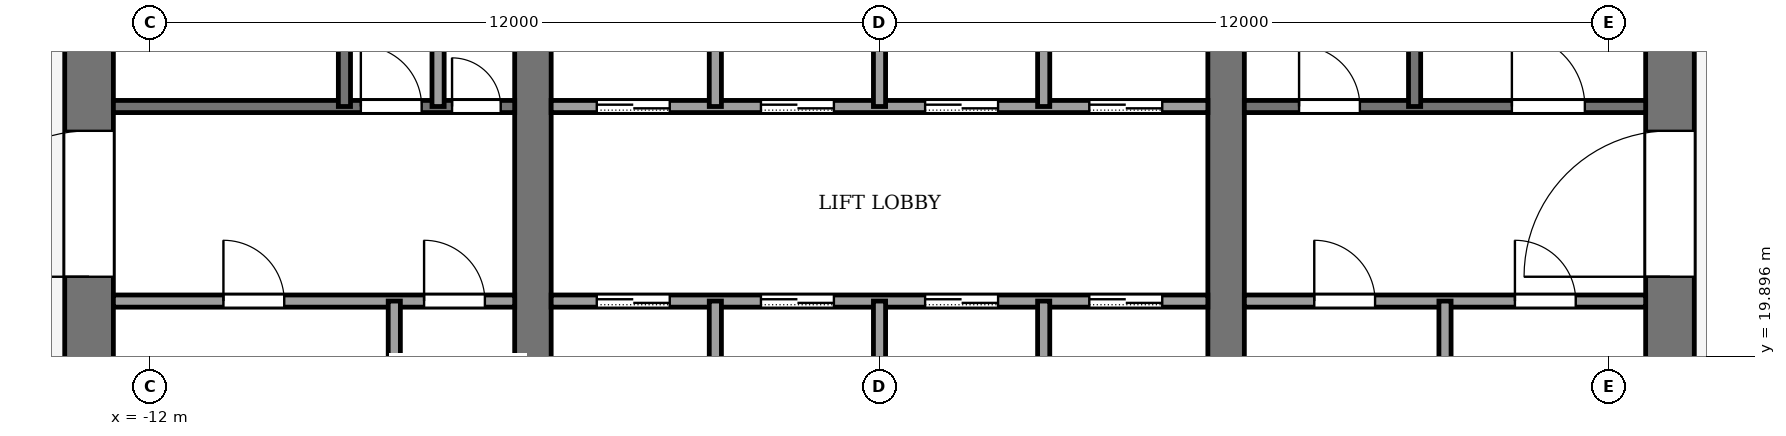
"""IFC4 building model, lengths in metres.
Left out: names, types, materials, properties, quantities, classifications, styles, units other than length and angle.
Written with IfcOpenShell. Run it as: python <this file> out.ifc"""

import sys

from ifc_helpers import new_model, si_unit, direction, frame, frame_2d, origin, place, context, subcontext, project, spatial, rectangle, extrude, element, fill, save


model = new_model("IFC4")
c1 = context("Model", 3, precision=1e-05, world=origin(), true_north=direction((0.0, 1.0)))
c2 = subcontext(c1, "Body", "Model", "MODEL_VIEW")
j1 = project(units=[si_unit("LENGTHUNIT", "METRE"), si_unit("PLANEANGLEUNIT", "RADIAN")], contexts=[c1])
p1 = place(None, origin())
s1 = spatial("IfcSite", under=j1, at=p1, CompositionType="ELEMENT")
p2 = place(p1, origin())
s2 = spatial("IfcBuilding", under=s1, at=p2, CompositionType="ELEMENT")
p3 = place(p2, frame((0.0, 0.0, 258.0)))
s3 = spatial("IfcBuildingStorey", under=s2, at=p3, CompositionType="ELEMENT", Elevation=258.0)
p4 = place(p3, frame((-13.0, 18.4, -0.13), z_axis=(0.0, 0.0, 1.0), x_axis=(0.0, 1.0, 0.0)))
e1 = element("IfcWall", 1, at=p4, inside=s3, PredefinedType="SHEAR", context=c2, shape_type="SweptSolid", body=[
    extrude(rectangle(XDim=19.2, YDim=0.8, at=frame_2d((9.6, 0.0))), origin(), (0.0, 0.0, 1.0), 4.0),
])
p5 = place(p4, frame((2.8, 0.0, 0.13)))
e2 = element("IfcOpeningElement", 2, at=p5, cuts=e1, PredefinedType="OPENING", context=c2, shape_type="SweptSolid", body=[
    extrude(rectangle(XDim=2.4, YDim=2.4, at=frame_2d((1.2, 1.2))), frame((0.0, 0.41, 0.0), z_axis=(0.0, -1.0, 0.0), x_axis=(1.0, 0.0, 0.0)), (0.0, 0.0, 1.0), 0.82),
])
p6 = place(p4, frame((13.4, 0.0, 0.13)))
e3 = element("IfcOpeningElement", 3, at=p6, cuts=e1, PredefinedType="OPENING", context=c2, shape_type="SweptSolid", body=[
    extrude(rectangle(XDim=1.4, YDim=2.2, at=frame_2d((0.7, 1.1))), frame((0.0, 0.41, 0.0), z_axis=(0.0, -1.0, 0.0), x_axis=(1.0, 0.0, 0.0)), (0.0, 0.0, 1.0), 0.82),
])
p7 = place(p3, frame((13.0, 18.4, -0.13), z_axis=(0.0, 0.0, 1.0), x_axis=(0.0, 1.0, 0.0)))
e4 = element("IfcWall", 4, at=p7, inside=s3, PredefinedType="SHEAR", context=c2, shape_type="SweptSolid", body=[
    extrude(rectangle(XDim=19.2, YDim=0.8, at=frame_2d((9.6, 0.0))), origin(), (0.0, 0.0, 1.0), 4.0),
])
p8 = place(p7, frame((2.8, 0.0, 0.13)))
e5 = element("IfcOpeningElement", 5, at=p8, cuts=e4, PredefinedType="OPENING", context=c2, shape_type="SweptSolid", body=[
    extrude(rectangle(XDim=2.4, YDim=2.4, at=frame_2d((1.2, 1.2))), frame((0.0, 0.41, 0.0), z_axis=(0.0, -1.0, 0.0), x_axis=(1.0, 0.0, 0.0)), (0.0, 0.0, 1.0), 0.82),
])
p9 = place(p7, frame((13.3, 0.0, 0.13)))
e6 = element("IfcOpeningElement", 6, at=p9, cuts=e4, PredefinedType="OPENING", context=c2, shape_type="SweptSolid", body=[
    extrude(rectangle(XDim=2.4, YDim=2.4, at=frame_2d((1.2, 1.2))), frame((0.0, 0.41, 0.0), z_axis=(0.0, -1.0, 0.0), x_axis=(1.0, 0.0, 0.0)), (0.0, 0.0, 1.0), 0.82),
])
p10 = place(p3, frame((-5.7, 18.4, -0.13), z_axis=(0.0, 0.0, 1.0), x_axis=(0.0, 1.0, 0.0)))
e7 = element("IfcWall", 7, at=p10, inside=s3, PredefinedType="SHEAR", context=c2, shape_type="SweptSolid", body=[
    extrude(rectangle(XDim=19.2, YDim=0.6, at=frame_2d((9.6, 0.0))), origin(), (0.0, 0.0, 1.0), 4.0),
])
p11 = place(p10, frame((8.35, 0.0, 0.13)))
e8 = element("IfcOpeningElement", 8, at=p11, cuts=e7, PredefinedType="OPENING", context=c2, shape_type="SweptSolid", body=[
    extrude(rectangle(XDim=0.9, YDim=2.1, at=frame_2d((0.45, 1.05))), frame((0.0, 0.31, 0.0), z_axis=(0.0, -1.0, 0.0), x_axis=(1.0, 0.0, 0.0)), (0.0, 0.0, 1.0), 0.62),
])
p12 = place(p3, frame((5.7, 18.4, -0.13), z_axis=(0.0, 0.0, 1.0), x_axis=(0.0, 1.0, 0.0)))
e9 = element("IfcWall", 9, at=p12, inside=s3, PredefinedType="SHEAR", context=c2, shape_type="SweptSolid", body=[
    extrude(rectangle(XDim=19.2, YDim=0.6, at=frame_2d((9.6, 0.0))), origin(), (0.0, 0.0, 1.0), 4.0),
])
p13 = place(p12, frame((8.35, 0.0, 0.13)))
e10 = element("IfcOpeningElement", 10, at=p13, cuts=e9, PredefinedType="OPENING", context=c2, shape_type="SweptSolid", body=[
    extrude(rectangle(XDim=0.9, YDim=2.1, at=frame_2d((0.45, 1.05))), frame((0.0, 0.31, 0.0), z_axis=(0.0, -1.0, 0.0), x_axis=(1.0, 0.0, 0.0)), (0.0, 0.0, 1.0), 0.62),
])
p14 = place(p12, frame((13.3, 0.0, 0.13)))
e11 = element("IfcOpeningElement", 11, at=p14, cuts=e9, PredefinedType="OPENING", context=c2, shape_type="SweptSolid", body=[
    extrude(rectangle(XDim=2.4, YDim=2.4, at=frame_2d((1.2, 1.2))), frame((0.0, 0.31, 0.0), z_axis=(0.0, -1.0, 0.0), x_axis=(1.0, 0.0, 0.0)), (0.0, 0.0, 1.0), 0.62),
])
p15 = place(p3, frame((-12.6, 20.8, 0.0), z_axis=(0.0, 0.0, 1.0), x_axis=(1.0, 0.0, 0.0)))
e12 = element("IfcWall", 12, at=p15, inside=s3, PredefinedType="PARTITIONING", context=c2, shape_type="SweptSolid", body=[
    extrude(rectangle(XDim=6.6, YDim=0.2, at=frame_2d((3.3, 0.0))), origin(), (0.0, 0.0, 1.0), 3.87),
])
p16 = place(p15, frame((1.81, 0.0, 0.0)))
e13 = element("IfcOpeningElement", 13, at=p16, cuts=e12, PredefinedType="OPENING", context=c2, shape_type="SweptSolid", body=[
    extrude(rectangle(XDim=1.0, YDim=2.1, at=frame_2d((0.5, 1.05))), frame((0.0, 0.11, 0.0), z_axis=(0.0, -1.0, 0.0), x_axis=(1.0, 0.0, 0.0)), (0.0, 0.0, 1.0), 0.22),
])
p17 = place(p15, frame((5.11, 0.0, 0.0)))
e14 = element("IfcOpeningElement", 14, at=p17, cuts=e12, PredefinedType="OPENING", context=c2, shape_type="SweptSolid", body=[
    extrude(rectangle(XDim=1.0, YDim=2.1, at=frame_2d((0.5, 1.05))), frame((0.0, 0.11, 0.0), z_axis=(0.0, -1.0, 0.0), x_axis=(1.0, 0.0, 0.0)), (0.0, 0.0, 1.0), 0.22),
])
p18 = place(p3, frame((-5.4, 20.8, 0.0), z_axis=(0.0, 0.0, 1.0), x_axis=(1.0, 0.0, 0.0)))
e15 = element("IfcWall", 15, at=p18, inside=s3, PredefinedType="PARTITIONING", context=c2, shape_type="SweptSolid", body=[
    extrude(rectangle(XDim=10.8, YDim=0.2, at=frame_2d((5.4, 0.0))), origin(), (0.0, 0.0, 1.0), 3.87),
])
p19 = place(p18, frame((0.75, 0.0, 0.0)))
e16 = element("IfcOpeningElement", 16, at=p19, cuts=e15, PredefinedType="OPENING", context=c2, shape_type="SweptSolid", body=[
    extrude(rectangle(XDim=1.2, YDim=2.2, at=frame_2d((0.6, 1.1))), frame((0.0, 0.11, 0.0), z_axis=(0.0, -1.0, 0.0), x_axis=(1.0, 0.0, 0.0)), (0.0, 0.0, 1.0), 0.22),
])
p20 = place(p18, frame((3.45, 0.0, 0.0)))
e17 = element("IfcOpeningElement", 17, at=p20, cuts=e15, PredefinedType="OPENING", context=c2, shape_type="SweptSolid", body=[
    extrude(rectangle(XDim=1.2, YDim=2.2, at=frame_2d((0.6, 1.1))), frame((0.0, 0.11, 0.0), z_axis=(0.0, -1.0, 0.0), x_axis=(1.0, 0.0, 0.0)), (0.0, 0.0, 1.0), 0.22),
])
p21 = place(p18, frame((6.15, 0.0, 0.0)))
e18 = element("IfcOpeningElement", 18, at=p21, cuts=e15, PredefinedType="OPENING", context=c2, shape_type="SweptSolid", body=[
    extrude(rectangle(XDim=1.2, YDim=2.2, at=frame_2d((0.6, 1.1))), frame((0.0, 0.11, 0.0), z_axis=(0.0, -1.0, 0.0), x_axis=(1.0, 0.0, 0.0)), (0.0, 0.0, 1.0), 0.22),
])
p22 = place(p18, frame((8.85, 0.0, 0.0)))
e19 = element("IfcOpeningElement", 19, at=p22, cuts=e15, PredefinedType="OPENING", context=c2, shape_type="SweptSolid", body=[
    extrude(rectangle(XDim=1.2, YDim=2.2, at=frame_2d((0.6, 1.1))), frame((0.0, 0.11, 0.0), z_axis=(0.0, -1.0, 0.0), x_axis=(1.0, 0.0, 0.0)), (0.0, 0.0, 1.0), 0.22),
])
p23 = place(p3, frame((6.0, 20.8, 0.0), z_axis=(0.0, 0.0, 1.0), x_axis=(1.0, 0.0, 0.0)))
e20 = element("IfcWall", 20, at=p23, inside=s3, PredefinedType="PARTITIONING", context=c2, shape_type="SweptSolid", body=[
    extrude(rectangle(XDim=6.6, YDim=0.2, at=frame_2d((3.3, 0.0))), origin(), (0.0, 0.0, 1.0), 3.87),
])
p24 = place(p23, frame((1.15, 0.0, 0.0)))
e21 = element("IfcOpeningElement", 21, at=p24, cuts=e20, PredefinedType="OPENING", context=c2, shape_type="SweptSolid", body=[
    extrude(rectangle(XDim=1.0, YDim=2.1, at=frame_2d((0.5, 1.05))), frame((0.0, 0.11, 0.0), z_axis=(0.0, -1.0, 0.0), x_axis=(1.0, 0.0, 0.0)), (0.0, 0.0, 1.0), 0.22),
])
p25 = place(p23, frame((4.45, 0.0, 0.0)))
e22 = element("IfcOpeningElement", 22, at=p25, cuts=e20, PredefinedType="OPENING", context=c2, shape_type="SweptSolid", body=[
    extrude(rectangle(XDim=1.0, YDim=2.1, at=frame_2d((0.5, 1.05))), frame((0.0, 0.11, 0.0), z_axis=(0.0, -1.0, 0.0), x_axis=(1.0, 0.0, 0.0)), (0.0, 0.0, 1.0), 0.22),
])
p26 = place(p3, frame((-12.6, 24.0, 0.0), z_axis=(0.0, 0.0, 1.0), x_axis=(1.0, 0.0, 0.0)))
e23 = element("IfcWall", 23, at=p26, inside=s3, PredefinedType="PARTITIONING", context=c2, shape_type="SweptSolid", body=[
    extrude(rectangle(XDim=6.6, YDim=0.2, at=frame_2d((3.3, 0.0))), origin(), (0.0, 0.0, 1.0), 3.87),
])
p27 = place(p26, frame((4.07, 0.0, 0.0)))
e24 = element("IfcOpeningElement", 24, at=p27, cuts=e23, PredefinedType="OPENING", context=c2, shape_type="SweptSolid", body=[
    extrude(rectangle(XDim=1.0, YDim=2.1, at=frame_2d((0.5, 1.05))), frame((0.0, 0.11, 0.0), z_axis=(0.0, -1.0, 0.0), x_axis=(1.0, 0.0, 0.0)), (0.0, 0.0, 1.0), 0.22),
])
p28 = place(p26, frame((5.57, 0.0, 0.0)))
e25 = element("IfcOpeningElement", 25, at=p28, cuts=e23, PredefinedType="OPENING", context=c2, shape_type="SweptSolid", body=[
    extrude(rectangle(XDim=0.8, YDim=2.1, at=frame_2d((0.4, 1.05))), frame((0.0, 0.11, 0.0), z_axis=(0.0, -1.0, 0.0), x_axis=(1.0, 0.0, 0.0)), (0.0, 0.0, 1.0), 0.22),
])
p29 = place(p3, frame((-5.4, 24.0, 0.0), z_axis=(0.0, 0.0, 1.0), x_axis=(1.0, 0.0, 0.0)))
e26 = element("IfcWall", 26, at=p29, inside=s3, PredefinedType="PARTITIONING", context=c2, shape_type="SweptSolid", body=[
    extrude(rectangle(XDim=10.8, YDim=0.2, at=frame_2d((5.4, 0.0))), origin(), (0.0, 0.0, 1.0), 3.87),
])
p30 = place(p29, frame((0.75, 0.0, 0.0)))
e27 = element("IfcOpeningElement", 27, at=p30, cuts=e26, PredefinedType="OPENING", context=c2, shape_type="SweptSolid", body=[
    extrude(rectangle(XDim=1.2, YDim=2.2, at=frame_2d((0.6, 1.1))), frame((0.0, 0.11, 0.0), z_axis=(0.0, -1.0, 0.0), x_axis=(1.0, 0.0, 0.0)), (0.0, 0.0, 1.0), 0.22),
])
p31 = place(p29, frame((3.45, 0.0, 0.0)))
e28 = element("IfcOpeningElement", 28, at=p31, cuts=e26, PredefinedType="OPENING", context=c2, shape_type="SweptSolid", body=[
    extrude(rectangle(XDim=1.2, YDim=2.2, at=frame_2d((0.6, 1.1))), frame((0.0, 0.11, 0.0), z_axis=(0.0, -1.0, 0.0), x_axis=(1.0, 0.0, 0.0)), (0.0, 0.0, 1.0), 0.22),
])
p32 = place(p29, frame((6.15, 0.0, 0.0)))
e29 = element("IfcOpeningElement", 29, at=p32, cuts=e26, PredefinedType="OPENING", context=c2, shape_type="SweptSolid", body=[
    extrude(rectangle(XDim=1.2, YDim=2.2, at=frame_2d((0.6, 1.1))), frame((0.0, 0.11, 0.0), z_axis=(0.0, -1.0, 0.0), x_axis=(1.0, 0.0, 0.0)), (0.0, 0.0, 1.0), 0.22),
])
p33 = place(p29, frame((8.85, 0.0, 0.0)))
e30 = element("IfcOpeningElement", 30, at=p33, cuts=e26, PredefinedType="OPENING", context=c2, shape_type="SweptSolid", body=[
    extrude(rectangle(XDim=1.2, YDim=2.2, at=frame_2d((0.6, 1.1))), frame((0.0, 0.11, 0.0), z_axis=(0.0, -1.0, 0.0), x_axis=(1.0, 0.0, 0.0)), (0.0, 0.0, 1.0), 0.22),
])
p34 = place(p3, frame((6.0, 24.0, 0.0), z_axis=(0.0, 0.0, 1.0), x_axis=(1.0, 0.0, 0.0)))
e31 = element("IfcWall", 31, at=p34, inside=s3, PredefinedType="PARTITIONING", context=c2, shape_type="SweptSolid", body=[
    extrude(rectangle(XDim=6.6, YDim=0.2, at=frame_2d((3.3, 0.0))), origin(), (0.0, 0.0, 1.0), 3.87),
])
p35 = place(p34, frame((0.9, 0.0, 0.0)))
e32 = element("IfcOpeningElement", 32, at=p35, cuts=e31, PredefinedType="OPENING", context=c2, shape_type="SweptSolid", body=[
    extrude(rectangle(XDim=1.0, YDim=2.1, at=frame_2d((0.5, 1.05))), frame((0.0, 0.11, 0.0), z_axis=(0.0, -1.0, 0.0), x_axis=(1.0, 0.0, 0.0)), (0.0, 0.0, 1.0), 0.22),
])
p36 = place(p34, frame((4.4, 0.0, 0.0)))
e33 = element("IfcOpeningElement", 33, at=p36, cuts=e31, PredefinedType="OPENING", context=c2, shape_type="SweptSolid", body=[
    extrude(rectangle(XDim=1.2, YDim=2.2, at=frame_2d((0.6, 1.1))), frame((0.0, 0.11, 0.0), z_axis=(0.0, -1.0, 0.0), x_axis=(1.0, 0.0, 0.0)), (0.0, 0.0, 1.0), 0.22),
])
p37 = place(p3, frame((-8.8, 24.0, 0.0), z_axis=(0.0, 0.0, 1.0), x_axis=(0.0, 1.0, 0.0)))
e34 = element("IfcWall", 34, at=p37, inside=s3, PredefinedType="PARTITIONING", context=c2, shape_type="SweptSolid", body=[
    extrude(rectangle(XDim=7.4, YDim=0.2, at=frame_2d((3.7, 0.0))), origin(), (0.0, 0.0, 1.0), 3.87),
])
p38 = place(p3, frame((-7.98, 18.4, 0.0), z_axis=(0.0, 0.0, 1.0), x_axis=(0.0, 1.0, 0.0)))
e35 = element("IfcWall", 35, at=p38, inside=s3, PredefinedType="PARTITIONING", context=c2, shape_type="SweptSolid", body=[
    extrude(rectangle(XDim=2.4, YDim=0.2, at=frame_2d((1.2, 0.0))), origin(), (0.0, 0.0, 1.0), 3.87),
])
p39 = place(p3, frame((-7.26, 24.0, 0.0), z_axis=(0.0, 0.0, 1.0), x_axis=(0.0, 1.0, 0.0)))
e36 = element("IfcWall", 36, at=p39, inside=s3, PredefinedType="PARTITIONING", context=c2, shape_type="SweptSolid", body=[
    extrude(rectangle(XDim=7.4, YDim=0.2, at=frame_2d((3.7, 0.0))), origin(), (0.0, 0.0, 1.0), 3.87),
])
p40 = place(p3, frame((-2.7, 18.4, 0.0), z_axis=(0.0, 0.0, 1.0), x_axis=(0.0, 1.0, 0.0)))
e37 = element("IfcWall", 37, at=p40, inside=s3, PredefinedType="PARTITIONING", context=c2, shape_type="SweptSolid", body=[
    extrude(rectangle(XDim=2.4, YDim=0.2, at=frame_2d((1.2, 0.0))), origin(), (0.0, 0.0, 1.0), 3.87),
])
p41 = place(p3, frame((-2.7, 24.0, 0.0), z_axis=(0.0, 0.0, 1.0), x_axis=(0.0, 1.0, 0.0)))
e38 = element("IfcWall", 38, at=p41, inside=s3, PredefinedType="PARTITIONING", context=c2, shape_type="SweptSolid", body=[
    extrude(rectangle(XDim=2.4, YDim=0.2, at=frame_2d((1.2, 0.0))), origin(), (0.0, 0.0, 1.0), 3.87),
])
p42 = place(p3, frame((0.0, 18.4, 0.0), z_axis=(0.0, 0.0, 1.0), x_axis=(0.0, 1.0, 0.0)))
e39 = element("IfcWall", 39, at=p42, inside=s3, PredefinedType="PARTITIONING", context=c2, shape_type="SweptSolid", body=[
    extrude(rectangle(XDim=2.4, YDim=0.2, at=frame_2d((1.2, 0.0))), origin(), (0.0, 0.0, 1.0), 3.87),
])
p43 = place(p3, frame((0.0, 24.0, 0.0), z_axis=(0.0, 0.0, 1.0), x_axis=(0.0, 1.0, 0.0)))
e40 = element("IfcWall", 40, at=p43, inside=s3, PredefinedType="PARTITIONING", context=c2, shape_type="SweptSolid", body=[
    extrude(rectangle(XDim=4.0, YDim=0.2, at=frame_2d((2.0, 0.0))), origin(), (0.0, 0.0, 1.0), 3.87),
])
p44 = place(p3, frame((2.7, 18.4, 0.0), z_axis=(0.0, 0.0, 1.0), x_axis=(0.0, 1.0, 0.0)))
e41 = element("IfcWall", 41, at=p44, inside=s3, PredefinedType="PARTITIONING", context=c2, shape_type="SweptSolid", body=[
    extrude(rectangle(XDim=2.4, YDim=0.2, at=frame_2d((1.2, 0.0))), origin(), (0.0, 0.0, 1.0), 3.87),
])
p45 = place(p3, frame((2.7, 24.0, 0.0), z_axis=(0.0, 0.0, 1.0), x_axis=(0.0, 1.0, 0.0)))
e42 = element("IfcWall", 42, at=p45, inside=s3, PredefinedType="PARTITIONING", context=c2, shape_type="SweptSolid", body=[
    extrude(rectangle(XDim=2.4, YDim=0.2, at=frame_2d((1.2, 0.0))), origin(), (0.0, 0.0, 1.0), 3.87),
])
p46 = place(p3, frame((8.8, 24.0, 0.0), z_axis=(0.0, 0.0, 1.0), x_axis=(0.0, 1.0, 0.0)))
e43 = element("IfcWall", 43, at=p46, inside=s3, PredefinedType="PARTITIONING", context=c2, shape_type="SweptSolid", body=[
    extrude(rectangle(XDim=7.4, YDim=0.2, at=frame_2d((3.7, 0.0))), origin(), (0.0, 0.0, 1.0), 3.87),
])
p47 = place(p3, frame((9.3, 18.4, 0.0), z_axis=(0.0, 0.0, 1.0), x_axis=(0.0, 1.0, 0.0)))
e44 = element("IfcWall", 44, at=p47, inside=s3, PredefinedType="PARTITIONING", context=c2, shape_type="SweptSolid", body=[
    extrude(rectangle(XDim=2.4, YDim=0.2, at=frame_2d((1.2, 0.0))), origin(), (0.0, 0.0, 1.0), 3.87),
])
p48 = place(p19, origin())
e45 = element("IfcDoor", 45, at=p48, inside=s3, OperationType="SLIDING_TO_LEFT", PredefinedType="DOOR", context=c2, shape_type="SweptSolid", body=[
    extrude(rectangle(XDim=1.2, YDim=2.2, at=frame_2d((0.6, 1.1))), frame((0.0, 0.025, 0.0), z_axis=(0.0, -1.0, 0.0), x_axis=(1.0, 0.0, 0.0)), (0.0, 0.0, 1.0), 0.05),
])
fill(e16, e45)
p49 = place(p20, origin())
e46 = element("IfcDoor", 46, at=p49, inside=s3, OperationType="SLIDING_TO_LEFT", PredefinedType="DOOR", context=c2, shape_type="SweptSolid", body=[
    extrude(rectangle(XDim=1.2, YDim=2.2, at=frame_2d((0.6, 1.1))), frame((0.0, 0.025, 0.0), z_axis=(0.0, -1.0, 0.0), x_axis=(1.0, 0.0, 0.0)), (0.0, 0.0, 1.0), 0.05),
])
fill(e17, e46)
p50 = place(p21, origin())
e47 = element("IfcDoor", 47, at=p50, inside=s3, OperationType="SLIDING_TO_LEFT", PredefinedType="DOOR", context=c2, shape_type="SweptSolid", body=[
    extrude(rectangle(XDim=1.2, YDim=2.2, at=frame_2d((0.6, 1.1))), frame((0.0, 0.025, 0.0), z_axis=(0.0, -1.0, 0.0), x_axis=(1.0, 0.0, 0.0)), (0.0, 0.0, 1.0), 0.05),
])
fill(e18, e47)
p51 = place(p22, origin())
e48 = element("IfcDoor", 48, at=p51, inside=s3, OperationType="SLIDING_TO_LEFT", PredefinedType="DOOR", context=c2, shape_type="SweptSolid", body=[
    extrude(rectangle(XDim=1.2, YDim=2.2, at=frame_2d((0.6, 1.1))), frame((0.0, 0.025, 0.0), z_axis=(0.0, -1.0, 0.0), x_axis=(1.0, 0.0, 0.0)), (0.0, 0.0, 1.0), 0.05),
])
fill(e19, e48)
p52 = place(p30, origin())
e49 = element("IfcDoor", 49, at=p52, inside=s3, OperationType="SLIDING_TO_LEFT", PredefinedType="DOOR", context=c2, shape_type="SweptSolid", body=[
    extrude(rectangle(XDim=1.2, YDim=2.2, at=frame_2d((0.6, 1.1))), frame((0.0, 0.025, 0.0), z_axis=(0.0, -1.0, 0.0), x_axis=(1.0, 0.0, 0.0)), (0.0, 0.0, 1.0), 0.05),
])
fill(e27, e49)
p53 = place(p31, origin())
e50 = element("IfcDoor", 50, at=p53, inside=s3, OperationType="SLIDING_TO_LEFT", PredefinedType="DOOR", context=c2, shape_type="SweptSolid", body=[
    extrude(rectangle(XDim=1.2, YDim=2.2, at=frame_2d((0.6, 1.1))), frame((0.0, 0.025, 0.0), z_axis=(0.0, -1.0, 0.0), x_axis=(1.0, 0.0, 0.0)), (0.0, 0.0, 1.0), 0.05),
])
fill(e28, e50)
p54 = place(p32, origin())
e51 = element("IfcDoor", 51, at=p54, inside=s3, OperationType="SLIDING_TO_LEFT", PredefinedType="DOOR", context=c2, shape_type="SweptSolid", body=[
    extrude(rectangle(XDim=1.2, YDim=2.2, at=frame_2d((0.6, 1.1))), frame((0.0, 0.025, 0.0), z_axis=(0.0, -1.0, 0.0), x_axis=(1.0, 0.0, 0.0)), (0.0, 0.0, 1.0), 0.05),
])
fill(e29, e51)
p55 = place(p33, origin())
e52 = element("IfcDoor", 52, at=p55, inside=s3, OperationType="SLIDING_TO_LEFT", PredefinedType="DOOR", context=c2, shape_type="SweptSolid", body=[
    extrude(rectangle(XDim=1.2, YDim=2.2, at=frame_2d((0.6, 1.1))), frame((0.0, 0.025, 0.0), z_axis=(0.0, -1.0, 0.0), x_axis=(1.0, 0.0, 0.0)), (0.0, 0.0, 1.0), 0.05),
])
fill(e30, e52)
p56 = place(p16, origin())
e53 = element("IfcDoor", 53, at=p56, inside=s3, OperationType="SINGLE_SWING_LEFT", PredefinedType="DOOR", context=c2, shape_type="SweptSolid", body=[
    extrude(rectangle(XDim=1.0, YDim=2.1, at=frame_2d((0.5, 1.05))), frame((0.0, 0.025, 0.0), z_axis=(0.0, -1.0, 0.0), x_axis=(1.0, 0.0, 0.0)), (0.0, 0.0, 1.0), 0.05),
])
fill(e13, e53)
p57 = place(p17, origin())
e54 = element("IfcDoor", 54, at=p57, inside=s3, OperationType="SINGLE_SWING_LEFT", PredefinedType="DOOR", context=c2, shape_type="SweptSolid", body=[
    extrude(rectangle(XDim=1.0, YDim=2.1, at=frame_2d((0.5, 1.05))), frame((0.0, 0.025, 0.0), z_axis=(0.0, -1.0, 0.0), x_axis=(1.0, 0.0, 0.0)), (0.0, 0.0, 1.0), 0.05),
])
fill(e14, e54)
p58 = place(p24, origin())
e55 = element("IfcDoor", 55, at=p58, inside=s3, OperationType="SINGLE_SWING_LEFT", PredefinedType="DOOR", context=c2, shape_type="SweptSolid", body=[
    extrude(rectangle(XDim=1.0, YDim=2.1, at=frame_2d((0.5, 1.05))), frame((0.0, 0.025, 0.0), z_axis=(0.0, -1.0, 0.0), x_axis=(1.0, 0.0, 0.0)), (0.0, 0.0, 1.0), 0.05),
])
fill(e21, e55)
p59 = place(p25, origin())
e56 = element("IfcDoor", 56, at=p59, inside=s3, OperationType="SINGLE_SWING_LEFT", PredefinedType="DOOR", context=c2, shape_type="SweptSolid", body=[
    extrude(rectangle(XDim=1.0, YDim=2.1, at=frame_2d((0.5, 1.05))), frame((0.0, 0.025, 0.0), z_axis=(0.0, -1.0, 0.0), x_axis=(1.0, 0.0, 0.0)), (0.0, 0.0, 1.0), 0.05),
])
fill(e22, e56)
p60 = place(p27, origin())
e57 = element("IfcDoor", 57, at=p60, inside=s3, OperationType="SINGLE_SWING_RIGHT", PredefinedType="DOOR", context=c2, shape_type="SweptSolid", body=[
    extrude(rectangle(XDim=1.0, YDim=2.1, at=frame_2d((0.5, 1.05))), frame((0.0, 0.025, 0.0), z_axis=(0.0, -1.0, 0.0), x_axis=(1.0, 0.0, 0.0)), (0.0, 0.0, 1.0), 0.05),
])
fill(e24, e57)
p61 = place(p28, origin())
e58 = element("IfcDoor", 58, at=p61, inside=s3, OperationType="SINGLE_SWING_LEFT", PredefinedType="DOOR", context=c2, shape_type="SweptSolid", body=[
    extrude(rectangle(XDim=0.8, YDim=2.1, at=frame_2d((0.4, 1.05))), frame((0.0, 0.025, 0.0), z_axis=(0.0, -1.0, 0.0), x_axis=(1.0, 0.0, 0.0)), (0.0, 0.0, 1.0), 0.05),
])
fill(e25, e58)
p62 = place(p35, origin())
e59 = element("IfcDoor", 59, at=p62, inside=s3, OperationType="SINGLE_SWING_RIGHT", PredefinedType="DOOR", context=c2, shape_type="SweptSolid", body=[
    extrude(rectangle(XDim=1.0, YDim=2.1, at=frame_2d((0.5, 1.05))), frame((0.0, 0.025, 0.0), z_axis=(0.0, -1.0, 0.0), x_axis=(1.0, 0.0, 0.0)), (0.0, 0.0, 1.0), 0.05),
])
fill(e32, e59)
p63 = place(p36, origin())
e60 = element("IfcDoor", 60, at=p63, inside=s3, OperationType="SINGLE_SWING_LEFT", PredefinedType="DOOR", context=c2, shape_type="SweptSolid", body=[
    extrude(rectangle(XDim=1.2, YDim=2.2, at=frame_2d((0.6, 1.1))), frame((0.0, 0.025, 0.0), z_axis=(0.0, -1.0, 0.0), x_axis=(1.0, 0.0, 0.0)), (0.0, 0.0, 1.0), 0.05),
])
fill(e33, e60)
p64 = place(p5, origin())
e61 = element("IfcDoor", 61, at=p64, inside=s3, OperationType="DOUBLE_DOOR_SINGLE_SWING", PredefinedType="DOOR", context=c2, shape_type="SweptSolid", body=[
    extrude(rectangle(XDim=2.4, YDim=2.4, at=frame_2d((1.2, 1.2))), frame((0.0, 0.025, 0.0), z_axis=(0.0, -1.0, 0.0), x_axis=(1.0, 0.0, 0.0)), (0.0, 0.0, 1.0), 0.05),
])
fill(e2, e61)
p65 = place(p8, origin())
e62 = element("IfcDoor", 62, at=p65, inside=s3, OperationType="DOUBLE_DOOR_SINGLE_SWING", PredefinedType="DOOR", context=c2, shape_type="SweptSolid", body=[
    extrude(rectangle(XDim=2.4, YDim=2.4, at=frame_2d((1.2, 1.2))), frame((0.0, 0.025, 0.0), z_axis=(0.0, -1.0, 0.0), x_axis=(1.0, 0.0, 0.0)), (0.0, 0.0, 1.0), 0.05),
])
fill(e5, e62)
save(model, sys.argv[1])
